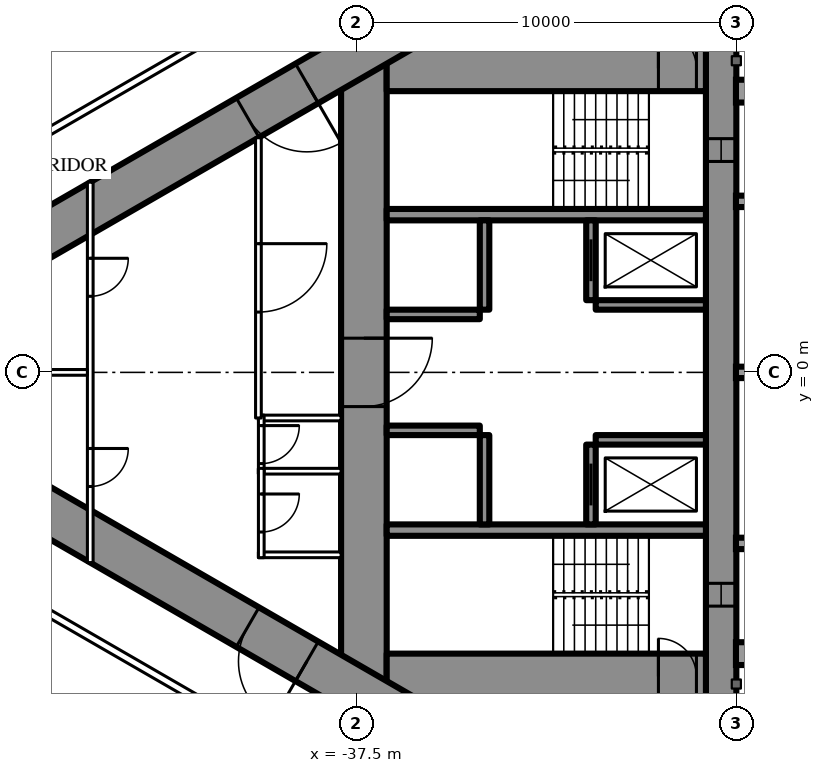
"""IFC4 building model, lengths in metres.
Left out: names, types, materials, properties, quantities, classifications, styles, units other than length and angle.
Written with IfcOpenShell. Run it as: python <this file> out.ifc"""

import sys

from ifc_helpers import new_model, si_unit, direction, frame, frame_2d, origin, place, context, subcontext, project, spatial, rectangle, extrude, element, fill, save


model = new_model("IFC4")
c1 = context("Model", 3, precision=1e-05, world=origin(), true_north=direction((0.0, 1.0)))
c2 = subcontext(c1, "Body", "Model", "MODEL_VIEW")
j1 = project(units=[si_unit("LENGTHUNIT", "METRE"), si_unit("PLANEANGLEUNIT", "RADIAN")], contexts=[c1])
p1 = place(None, origin())
s1 = spatial("IfcSite", under=j1, at=p1, CompositionType="ELEMENT")
p2 = place(p1, origin())
s2 = spatial("IfcBuilding", under=s1, at=p2, CompositionType="ELEMENT")
p3 = place(p2, frame((0.0, 0.0, 94.1)))
s3 = spatial("IfcBuildingStorey", under=s2, at=p3, CompositionType="ELEMENT", Elevation=94.1)
p4 = place(p3, frame((-27.9, 8.6, 0.0), z_axis=(0.0, 0.0, 1.0), x_axis=(0.0, -1.0, 0.0)))
e1 = element("IfcWall", 1, at=p4, inside=s3, PredefinedType="SHEAR", context=c2, shape_type="SweptSolid", body=[
    extrude(rectangle(XDim=17.2, YDim=0.8, at=frame_2d((8.6, 0.0))), origin(), (0.0, 0.0, 1.0), 3.5),
])
p5 = place(p4, frame((2.45, 0.0, 0.6)))
e2 = element("IfcOpeningElement", 2, at=p5, cuts=e1, PredefinedType="OPENING", context=c2, shape_type="SweptSolid", body=[
    extrude(rectangle(XDim=0.6, YDim=2.1, at=frame_2d((0.3, 1.05))), frame((0.0, 0.41, 0.0), z_axis=(0.0, -1.0, 0.0), x_axis=(1.0, 0.0, 0.0)), (0.0, 0.0, 1.0), 0.82),
])
p6 = place(p4, frame((14.15, 0.0, 0.6)))
e3 = element("IfcOpeningElement", 3, at=p6, cuts=e1, PredefinedType="OPENING", context=c2, shape_type="SweptSolid", body=[
    extrude(rectangle(XDim=0.6, YDim=2.1, at=frame_2d((0.3, 1.05))), frame((0.0, 0.41, 0.0), z_axis=(0.0, -1.0, 0.0), x_axis=(1.0, 0.0, 0.0)), (0.0, 0.0, 1.0), 0.82),
])
p7 = place(p3, frame((-37.3, 8.6, 0.0), z_axis=(0.0, 0.0, 1.0), x_axis=(0.0, -1.0, 0.0)))
e4 = element("IfcWall", 4, at=p7, inside=s3, PredefinedType="SHEAR", context=c2, shape_type="SweptSolid", body=[
    extrude(rectangle(XDim=17.2, YDim=1.2, at=frame_2d((8.6, 0.0))), origin(), (0.0, 0.0, 1.0), 3.5),
])
p8 = place(p7, frame((7.7, 0.0, 0.0)))
e5 = element("IfcOpeningElement", 5, at=p8, cuts=e4, PredefinedType="OPENING", context=c2, shape_type="SweptSolid", body=[
    extrude(rectangle(XDim=1.8, YDim=2.2, at=frame_2d((0.9, 1.1))), frame((0.0, 0.61, 0.0), z_axis=(0.0, -1.0, 0.0), x_axis=(1.0, 0.0, 0.0)), (0.0, 0.0, 1.0), 1.22),
])
p9 = place(p3, frame((-28.3, 8.0, 0.0), z_axis=(0.0, 0.0, 1.0), x_axis=(-1.0, 0.0, 0.0)))
e6 = element("IfcWall", 6, at=p9, inside=s3, PredefinedType="SHEAR", context=c2, shape_type="SweptSolid", body=[
    extrude(rectangle(XDim=8.4, YDim=1.2, at=frame_2d((4.2, 0.0))), origin(), (0.0, 0.0, 1.0), 3.5),
])
p10 = place(p9, frame((0.25, 0.0, 0.0)))
e7 = element("IfcOpeningElement", 7, at=p10, cuts=e6, PredefinedType="OPENING", context=c2, shape_type="SweptSolid", body=[
    extrude(rectangle(XDim=1.0, YDim=2.2, at=frame_2d((0.5, 1.1))), frame((0.0, 0.61, 0.0), z_axis=(0.0, -1.0, 0.0), x_axis=(1.0, 0.0, 0.0)), (0.0, 0.0, 1.0), 1.22),
])
p11 = place(p3, frame((-28.3, -8.0, 0.0), z_axis=(0.0, 0.0, 1.0), x_axis=(-1.0, 0.0, 0.0)))
e8 = element("IfcWall", 8, at=p11, inside=s3, PredefinedType="SHEAR", context=c2, shape_type="SweptSolid", body=[
    extrude(rectangle(XDim=8.4, YDim=1.2, at=frame_2d((4.2, 0.0))), origin(), (0.0, 0.0, 1.0), 3.5),
])
p12 = place(p11, frame((0.25, 0.0, 0.0)))
e9 = element("IfcOpeningElement", 9, at=p12, cuts=e8, PredefinedType="OPENING", context=c2, shape_type="SweptSolid", body=[
    extrude(rectangle(XDim=1.0, YDim=2.2, at=frame_2d((0.5, 1.1))), frame((0.0, 0.61, 0.0), z_axis=(0.0, -1.0, 0.0), x_axis=(1.0, 0.0, 0.0)), (0.0, 0.0, 1.0), 1.22),
])
for number, where, z_axis, x_axis in (
    (10, (-28.3, 4.15, 0.0), (0.0, 0.0, 1.0), (-1.0, 0.0, 0.0)),
    (11, (-28.3, -4.15, 0.0), (0.0, 0.0, 1.0), (-1.0, 0.0, 0.0)),
):
    element("IfcWall", number, at=place(p3, frame(where, z_axis=z_axis, x_axis=x_axis)), inside=s3, PredefinedType="SHEAR", context=c2, shape_type="SweptSolid", body=[
        extrude(rectangle(XDim=8.4, YDim=0.3, at=frame_2d((4.2, 0.0))), origin(), (0.0, 0.0, 1.0), 3.5),
    ])
p13 = place(p3, frame((-31.325, 4.0, 0.0), z_axis=(0.0, 0.0, 1.0), x_axis=(0.0, -1.0, 0.0)))
e12 = element("IfcWall", 12, at=p13, inside=s3, PredefinedType="SHEAR", context=c2, shape_type="SweptSolid", body=[
    extrude(rectangle(XDim=2.1, YDim=0.25, at=frame_2d((1.05, 0.0))), origin(), (0.0, 0.0, 1.0), 3.5),
])
p14 = place(p13, frame((0.5, 0.0, 0.0)))
e13 = element("IfcOpeningElement", 13, at=p14, cuts=e12, PredefinedType="OPENING", context=c2, shape_type="SweptSolid", body=[
    extrude(rectangle(XDim=1.1, YDim=2.2, at=frame_2d((0.55, 1.1))), frame((0.0, 0.135, 0.0), z_axis=(0.0, -1.0, 0.0), x_axis=(1.0, 0.0, 0.0)), (0.0, 0.0, 1.0), 0.27),
])
p15 = place(p3, frame((-34.125, 4.0, 0.0), z_axis=(0.0, 0.0, 1.0), x_axis=(0.0, -1.0, 0.0)))
e14 = element("IfcWall", 14, at=p15, inside=s3, PredefinedType="SHEAR", context=c2, shape_type="SweptSolid", body=[
    extrude(rectangle(XDim=2.35, YDim=0.25, at=frame_2d((1.175, 0.0))), origin(), (0.0, 0.0, 1.0), 3.5),
])
p16 = place(p3, frame((-28.3, 1.775, 0.0), z_axis=(0.0, 0.0, 1.0), x_axis=(-1.0, 0.0, 0.0)))
e15 = element("IfcWall", 15, at=p16, inside=s3, PredefinedType="SHEAR", context=c2, shape_type="SweptSolid", body=[
    extrude(rectangle(XDim=2.9, YDim=0.25, at=frame_2d((1.45, 0.0))), origin(), (0.0, 0.0, 1.0), 3.5),
])
p17 = place(p3, frame((-34.25, 1.525, 0.0), z_axis=(0.0, 0.0, 1.0), x_axis=(-1.0, 0.0, 0.0)))
e16 = element("IfcWall", 16, at=p17, inside=s3, PredefinedType="SHEAR", context=c2, shape_type="SweptSolid", body=[
    extrude(rectangle(XDim=2.45, YDim=0.25, at=frame_2d((1.225, 0.0))), origin(), (0.0, 0.0, 1.0), 3.5),
])
p18 = place(p3, frame((-31.325, -1.9, 0.0), z_axis=(0.0, 0.0, 1.0), x_axis=(0.0, -1.0, 0.0)))
e17 = element("IfcWall", 17, at=p18, inside=s3, PredefinedType="SHEAR", context=c2, shape_type="SweptSolid", body=[
    extrude(rectangle(XDim=2.1, YDim=0.25, at=frame_2d((1.05, 0.0))), origin(), (0.0, 0.0, 1.0), 3.5),
])
p19 = place(p18, frame((0.5, 0.0, 0.0)))
e18 = element("IfcOpeningElement", 18, at=p19, cuts=e17, PredefinedType="OPENING", context=c2, shape_type="SweptSolid", body=[
    extrude(rectangle(XDim=1.1, YDim=2.2, at=frame_2d((0.55, 1.1))), frame((0.0, 0.135, 0.0), z_axis=(0.0, -1.0, 0.0), x_axis=(1.0, 0.0, 0.0)), (0.0, 0.0, 1.0), 0.27),
])
p20 = place(p3, frame((-34.125, -1.65, 0.0), z_axis=(0.0, 0.0, 1.0), x_axis=(0.0, -1.0, 0.0)))
e19 = element("IfcWall", 19, at=p20, inside=s3, PredefinedType="SHEAR", context=c2, shape_type="SweptSolid", body=[
    extrude(rectangle(XDim=2.35, YDim=0.25, at=frame_2d((1.175, 0.0))), origin(), (0.0, 0.0, 1.0), 3.5),
])
p21 = place(p3, frame((-28.3, -1.775, 0.0), z_axis=(0.0, 0.0, 1.0), x_axis=(-1.0, 0.0, 0.0)))
e20 = element("IfcWall", 20, at=p21, inside=s3, PredefinedType="SHEAR", context=c2, shape_type="SweptSolid", body=[
    extrude(rectangle(XDim=2.9, YDim=0.25, at=frame_2d((1.45, 0.0))), origin(), (0.0, 0.0, 1.0), 3.5),
])
p22 = place(p3, frame((-34.25, -1.525, 0.0), z_axis=(0.0, 0.0, 1.0), x_axis=(-1.0, 0.0, 0.0)))
e21 = element("IfcWall", 21, at=p22, inside=s3, PredefinedType="SHEAR", context=c2, shape_type="SweptSolid", body=[
    extrude(rectangle(XDim=2.45, YDim=0.25, at=frame_2d((1.225, 0.0))), origin(), (0.0, 0.0, 1.0), 3.5),
])
p23 = place(p3, frame((-27.2, 14.3, 0.0), z_axis=(0.0, 0.0, 1.0), x_axis=(-0.866026593062, -0.499997940104, 0.0)))
e22 = element("IfcWall", 22, at=p23, inside=s3, PredefinedType="SHEAR", context=c2, shape_type="SweptSolid", body=[
    extrude(rectangle(XDim=28.946, YDim=1.2, at=frame_2d((14.473, 0.0))), origin(), (0.0, 0.0, 1.0), 3.5),
])
p24 = place(p23, frame((4.6, 0.0, 0.0)))
e23 = element("IfcOpeningElement", 23, at=p24, cuts=e22, PredefinedType="OPENING", context=c2, shape_type="SweptSolid", body=[
    extrude(rectangle(XDim=1.0, YDim=2.2, at=frame_2d((0.5, 1.1))), frame((0.0, 0.61, 0.0), z_axis=(0.0, -1.0, 0.0), x_axis=(1.0, 0.0, 0.0)), (0.0, 0.0, 1.0), 1.22),
])
p25 = place(p23, frame((13.395, 0.0, 0.0)))
e24 = element("IfcOpeningElement", 24, at=p25, cuts=e22, PredefinedType="OPENING", context=c2, shape_type="SweptSolid", body=[
    extrude(rectangle(XDim=1.8, YDim=2.2, at=frame_2d((0.9, 1.1))), frame((0.0, 0.61, 0.0), z_axis=(0.0, -1.0, 0.0), x_axis=(1.0, 0.0, 0.0)), (0.0, 0.0, 1.0), 1.22),
])
p26 = place(p3, frame((-27.2, -14.3, 0.0), z_axis=(0.0, 0.0, 1.0), x_axis=(-0.866024021859, 0.500002393557, 0.0)))
e25 = element("IfcWall", 25, at=p26, inside=s3, PredefinedType="SHEAR", context=c2, shape_type="SweptSolid", body=[
    extrude(rectangle(XDim=27.907, YDim=1.2, at=frame_2d((13.954, 0.0))), origin(), (0.0, 0.0, 1.0), 3.5),
])
p27 = place(p26, frame((4.6, 0.0, 0.0)))
e26 = element("IfcOpeningElement", 26, at=p27, cuts=e25, PredefinedType="OPENING", context=c2, shape_type="SweptSolid", body=[
    extrude(rectangle(XDim=1.0, YDim=2.2, at=frame_2d((0.5, 1.1))), frame((0.0, 0.61, 0.0), z_axis=(0.0, -1.0, 0.0), x_axis=(1.0, 0.0, 0.0)), (0.0, 0.0, 1.0), 1.22),
])
p28 = place(p26, frame((13.395, 0.0, 0.0)))
e27 = element("IfcOpeningElement", 27, at=p28, cuts=e25, PredefinedType="OPENING", context=c2, shape_type="SweptSolid", body=[
    extrude(rectangle(XDim=1.8, YDim=2.2, at=frame_2d((0.9, 1.1))), frame((0.0, 0.61, 0.0), z_axis=(0.0, -1.0, 0.0), x_axis=(1.0, 0.0, 0.0)), (0.0, 0.0, 1.0), 1.22),
])
p29 = place(p3, frame((-37.7, 10.894, 0.0), z_axis=(0.0, 0.0, 1.0), x_axis=(-0.866027905338, -0.499995667157, 0.0)))
e28 = element("IfcWall", 28, at=p29, inside=s3, PredefinedType="PARTITIONING", context=c2, shape_type="SweptSolid", body=[
    extrude(rectangle(XDim=21.787, YDim=0.2, at=frame_2d((10.894, 0.0))), origin(), (0.0, 0.0, 1.0), 3.25),
])
p30 = place(p29, frame((17.887, 0.0, 0.0)))
e29 = element("IfcOpeningElement", 29, at=p30, cuts=e28, PredefinedType="OPENING", context=c2, shape_type="SweptSolid", body=[
    extrude(rectangle(XDim=0.95, YDim=2.2, at=frame_2d((0.475, 1.1))), frame((0.0, 0.11, 0.0), z_axis=(0.0, -1.0, 0.0), x_axis=(1.0, 0.0, 0.0)), (0.0, 0.0, 1.0), 0.22),
])
p31 = place(p29, frame((9.531, 0.0, 0.0)))
e30 = element("IfcOpeningElement", 30, at=p31, cuts=e28, PredefinedType="OPENING", context=c2, shape_type="SweptSolid", body=[
    extrude(rectangle(XDim=0.95, YDim=2.2, at=frame_2d((0.475, 1.1))), frame((0.0, 0.11, 0.0), z_axis=(0.0, -1.0, 0.0), x_axis=(1.0, 0.0, 0.0)), (0.0, 0.0, 1.0), 0.22),
])
p32 = place(p3, frame((-36.92, -11.344, 0.0), z_axis=(0.0, 0.0, 1.0), x_axis=(-0.866028313256, 0.499994960614, 0.0)))
e31 = element("IfcWall", 31, at=p32, inside=s3, PredefinedType="PARTITIONING", context=c2, shape_type="SweptSolid", body=[
    extrude(rectangle(XDim=22.568, YDim=0.2, at=frame_2d((11.284, 0.0))), origin(), (0.0, 0.0, 1.0), 3.25),
])
p33 = place(p32, frame((14.481, 0.0, 0.0)))
e32 = element("IfcOpeningElement", 32, at=p33, cuts=e31, PredefinedType="OPENING", context=c2, shape_type="SweptSolid", body=[
    extrude(rectangle(XDim=0.95, YDim=2.2, at=frame_2d((0.475, 1.1))), frame((0.0, 0.11, 0.0), z_axis=(0.0, -1.0, 0.0), x_axis=(1.0, 0.0, 0.0)), (0.0, 0.0, 1.0), 0.22),
])
p34 = place(p32, frame((3.35, 0.0, 0.0)))
e33 = element("IfcOpeningElement", 33, at=p34, cuts=e31, PredefinedType="OPENING", context=c2, shape_type="SweptSolid", body=[
    extrude(rectangle(XDim=1.0, YDim=2.2, at=frame_2d((0.5, 1.1))), frame((0.0, 0.11, 0.0), z_axis=(0.0, -1.0, 0.0), x_axis=(1.0, 0.0, 0.0)), (0.0, 0.0, 1.0), 0.22),
])
for number, where, z_axis, x_axis in (
    (34, (-37.9, -1.2, 0.0), (0.0, 0.0, 1.0), (-1.0, 0.0, 0.0)),
    (35, (-37.9, -2.6, 0.0), (0.0, 0.0, 1.0), (-1.0, 0.0, 0.0)),
    (36, (-37.9, -4.8, 0.0), (0.0, 0.0, 1.0), (-1.0, 0.0, 0.0)),
):
    element("IfcWall", number, at=place(p3, frame(where, z_axis=z_axis, x_axis=x_axis)), inside=s3, PredefinedType="PARTITIONING", context=c2, shape_type="SweptSolid", body=[
        extrude(rectangle(XDim=2.175, YDim=0.15, at=frame_2d((1.087, 0.0))), origin(), (0.0, 0.0, 1.0), 3.25),
    ])
p35 = place(p3, frame((-40.0, -1.125, 0.0), z_axis=(0.0, 0.0, 1.0), x_axis=(0.0, -1.0, 0.0)))
e37 = element("IfcWall", 37, at=p35, inside=s3, PredefinedType="PARTITIONING", context=c2, shape_type="SweptSolid", body=[
    extrude(rectangle(XDim=1.55, YDim=0.15, at=frame_2d((0.775, 0.0))), origin(), (0.0, 0.0, 1.0), 3.25),
])
p36 = place(p35, frame((0.275, 0.0, 0.0)))
e38 = element("IfcOpeningElement", 38, at=p36, cuts=e37, PredefinedType="OPENING", context=c2, shape_type="SweptSolid", body=[
    extrude(rectangle(XDim=1.0, YDim=2.2, at=frame_2d((0.5, 1.1))), frame((0.0, 0.085, 0.0), z_axis=(0.0, -1.0, 0.0), x_axis=(1.0, 0.0, 0.0)), (0.0, 0.0, 1.0), 0.17),
])
p37 = place(p3, frame((-40.0, -2.525, 0.0), z_axis=(0.0, 0.0, 1.0), x_axis=(0.0, -1.0, 0.0)))
e39 = element("IfcWall", 39, at=p37, inside=s3, PredefinedType="PARTITIONING", context=c2, shape_type="SweptSolid", body=[
    extrude(rectangle(XDim=2.35, YDim=0.15, at=frame_2d((1.175, 0.0))), origin(), (0.0, 0.0, 1.0), 3.25),
])
p38 = place(p37, frame((0.675, 0.0, 0.0)))
e40 = element("IfcOpeningElement", 40, at=p38, cuts=e39, PredefinedType="OPENING", context=c2, shape_type="SweptSolid", body=[
    extrude(rectangle(XDim=1.0, YDim=2.2, at=frame_2d((0.5, 1.1))), frame((0.0, 0.085, 0.0), z_axis=(0.0, -1.0, 0.0), x_axis=(1.0, 0.0, 0.0)), (0.0, 0.0, 1.0), 0.17),
])
p39 = place(p3, frame((-40.075, 6.174, 0.0), z_axis=(0.0, 0.0, 1.0), x_axis=(0.0, -1.0, 0.0)))
e41 = element("IfcWall", 41, at=p39, inside=s3, PredefinedType="PARTITIONING", context=c2, shape_type="SweptSolid", body=[
    extrude(rectangle(XDim=7.374, YDim=0.15, at=frame_2d((3.687, 0.0))), origin(), (0.0, 0.0, 1.0), 3.25),
])
p40 = place(p39, frame((2.787, 0.0, 0.0)))
e42 = element("IfcOpeningElement", 42, at=p40, cuts=e41, PredefinedType="OPENING", context=c2, shape_type="SweptSolid", body=[
    extrude(rectangle(XDim=1.8, YDim=2.2, at=frame_2d((0.9, 1.1))), frame((0.0, 0.085, 0.0), z_axis=(0.0, -1.0, 0.0), x_axis=(1.0, 0.0, 0.0)), (0.0, 0.0, 1.0), 0.17),
])
p41 = place(p3, frame((-44.5, 5.005, 0.0), z_axis=(0.0, 0.0, 1.0), x_axis=(0.0, -1.0, 0.0)))
e43 = element("IfcWall", 43, at=p41, inside=s3, PredefinedType="PARTITIONING", context=c2, shape_type="SweptSolid", body=[
    extrude(rectangle(XDim=10.009, YDim=0.15, at=frame_2d((5.005, 0.0))), origin(), (0.0, 0.0, 1.0), 2.45),
])
p42 = place(p41, frame((2.002, 0.0, 0.0)))
e44 = element("IfcOpeningElement", 44, at=p42, cuts=e43, PredefinedType="OPENING", context=c2, shape_type="SweptSolid", body=[
    extrude(rectangle(XDim=1.0, YDim=2.2, at=frame_2d((0.5, 1.1))), frame((0.0, 0.085, 0.0), z_axis=(0.0, -1.0, 0.0), x_axis=(1.0, 0.0, 0.0)), (0.0, 0.0, 1.0), 0.17),
])
p43 = place(p41, frame((7.007, 0.0, 0.0)))
e45 = element("IfcOpeningElement", 45, at=p43, cuts=e43, PredefinedType="OPENING", context=c2, shape_type="SweptSolid", body=[
    extrude(rectangle(XDim=1.0, YDim=2.2, at=frame_2d((0.5, 1.1))), frame((0.0, 0.085, 0.0), z_axis=(0.0, -1.0, 0.0), x_axis=(1.0, 0.0, 0.0)), (0.0, 0.0, 1.0), 0.17),
])
p44 = place(p3, frame((-44.575, 0.0, 0.0), z_axis=(0.0, 0.0, 1.0), x_axis=(-1.0, 0.0, 0.0)))
e46 = element("IfcWall", 46, at=p44, inside=s3, PredefinedType="PARTITIONING", context=c2, shape_type="SweptSolid", body=[
    extrude(rectangle(XDim=8.593, YDim=0.15, at=frame_2d((4.297, 0.0))), origin(), (0.0, 0.0, 1.0), 2.2),
])
p45 = place(p36, origin())
e47 = element("IfcDoor", 47, at=p45, inside=s3, OperationType="SINGLE_SWING_LEFT", PredefinedType="DOOR", context=c2, shape_type="SweptSolid", body=[
    extrude(rectangle(XDim=1.0, YDim=2.2, at=frame_2d((0.5, 1.1))), frame((0.0, 0.025, 0.0), z_axis=(0.0, -1.0, 0.0), x_axis=(1.0, 0.0, 0.0)), (0.0, 0.0, 1.0), 0.05),
])
fill(e38, e47)
p46 = place(p38, origin())
e48 = element("IfcDoor", 48, at=p46, inside=s3, OperationType="SINGLE_SWING_LEFT", PredefinedType="DOOR", context=c2, shape_type="SweptSolid", body=[
    extrude(rectangle(XDim=1.0, YDim=2.2, at=frame_2d((0.5, 1.1))), frame((0.0, 0.025, 0.0), z_axis=(0.0, -1.0, 0.0), x_axis=(1.0, 0.0, 0.0)), (0.0, 0.0, 1.0), 0.05),
])
fill(e40, e48)
p47 = place(p40, origin())
e49 = element("IfcDoor", 49, at=p47, inside=s3, OperationType="DOUBLE_DOOR_SINGLE_SWING", PredefinedType="DOOR", context=c2, shape_type="SweptSolid", body=[
    extrude(rectangle(XDim=1.8, YDim=2.2, at=frame_2d((0.9, 1.1))), frame((0.0, 0.025, 0.0), z_axis=(0.0, -1.0, 0.0), x_axis=(1.0, 0.0, 0.0)), (0.0, 0.0, 1.0), 0.05),
])
fill(e42, e49)
p48 = place(p42, origin())
e50 = element("IfcDoor", 50, at=p48, inside=s3, OperationType="SINGLE_SWING_LEFT", PredefinedType="DOOR", context=c2, shape_type="SweptSolid", body=[
    extrude(rectangle(XDim=1.0, YDim=2.2, at=frame_2d((0.5, 1.1))), frame((0.0, 0.025, 0.0), z_axis=(0.0, -1.0, 0.0), x_axis=(1.0, 0.0, 0.0)), (0.0, 0.0, 1.0), 0.05),
])
fill(e44, e50)
p49 = place(p43, origin())
e51 = element("IfcDoor", 51, at=p49, inside=s3, OperationType="SINGLE_SWING_LEFT", PredefinedType="DOOR", context=c2, shape_type="SweptSolid", body=[
    extrude(rectangle(XDim=1.0, YDim=2.2, at=frame_2d((0.5, 1.1))), frame((0.0, 0.025, 0.0), z_axis=(0.0, -1.0, 0.0), x_axis=(1.0, 0.0, 0.0)), (0.0, 0.0, 1.0), 0.05),
])
fill(e45, e51)
p50 = place(p25, origin())
e52 = element("IfcDoor", 52, at=p50, inside=s3, OperationType="DOUBLE_DOOR_SINGLE_SWING", PredefinedType="DOOR", context=c2, shape_type="SweptSolid", body=[
    extrude(rectangle(XDim=1.8, YDim=2.2, at=frame_2d((0.9, 1.1))), frame((0.0, 0.025, 0.0), z_axis=(0.0, -1.0, 0.0), x_axis=(1.0, 0.0, 0.0)), (0.0, 0.0, 1.0), 0.05),
])
fill(e24, e52)
p51 = place(p28, origin())
e53 = element("IfcDoor", 53, at=p51, inside=s3, OperationType="DOUBLE_DOOR_SINGLE_SWING", PredefinedType="DOOR", context=c2, shape_type="SweptSolid", body=[
    extrude(rectangle(XDim=1.8, YDim=2.2, at=frame_2d((0.9, 1.1))), frame((0.0, 0.025, 0.0), z_axis=(0.0, -1.0, 0.0), x_axis=(1.0, 0.0, 0.0)), (0.0, 0.0, 1.0), 0.05),
])
fill(e27, e53)
p52 = place(p8, origin())
e54 = element("IfcDoor", 54, at=p52, inside=s3, OperationType="DOUBLE_DOOR_SINGLE_SWING", PredefinedType="DOOR", context=c2, shape_type="SweptSolid", body=[
    extrude(rectangle(XDim=1.8, YDim=2.2, at=frame_2d((0.9, 1.1))), frame((0.0, 0.025, 0.0), z_axis=(0.0, -1.0, 0.0), x_axis=(1.0, 0.0, 0.0)), (0.0, 0.0, 1.0), 0.05),
])
fill(e5, e54)
p53 = place(p10, origin())
e55 = element("IfcDoor", 55, at=p53, inside=s3, OperationType="SINGLE_SWING_RIGHT", PredefinedType="DOOR", context=c2, shape_type="SweptSolid", body=[
    extrude(rectangle(XDim=1.0, YDim=2.2, at=frame_2d((0.5, 1.1))), frame((0.0, 0.025, 0.0), z_axis=(0.0, -1.0, 0.0), x_axis=(1.0, 0.0, 0.0)), (0.0, 0.0, 1.0), 0.05),
])
fill(e7, e55)
p54 = place(p12, origin())
e56 = element("IfcDoor", 56, at=p54, inside=s3, OperationType="SINGLE_SWING_RIGHT", PredefinedType="DOOR", context=c2, shape_type="SweptSolid", body=[
    extrude(rectangle(XDim=1.0, YDim=2.2, at=frame_2d((0.5, 1.1))), frame((0.0, 0.025, 0.0), z_axis=(0.0, -1.0, 0.0), x_axis=(1.0, 0.0, 0.0)), (0.0, 0.0, 1.0), 0.05),
])
fill(e9, e56)
p55 = place(p14, origin())
e57 = element("IfcDoor", 57, at=p55, inside=s3, OperationType="SLIDING_TO_LEFT", PredefinedType="USERDEFINED", context=c2, shape_type="SweptSolid", body=[
    extrude(rectangle(XDim=1.1, YDim=2.2, at=frame_2d((0.55, 1.1))), frame((0.0, 0.025, 0.0), z_axis=(0.0, -1.0, 0.0), x_axis=(1.0, 0.0, 0.0)), (0.0, 0.0, 1.0), 0.05),
])
fill(e13, e57)
p56 = place(p19, origin())
e58 = element("IfcDoor", 58, at=p56, inside=s3, OperationType="SLIDING_TO_LEFT", PredefinedType="USERDEFINED", context=c2, shape_type="SweptSolid", body=[
    extrude(rectangle(XDim=1.1, YDim=2.2, at=frame_2d((0.55, 1.1))), frame((0.0, 0.025, 0.0), z_axis=(0.0, -1.0, 0.0), x_axis=(1.0, 0.0, 0.0)), (0.0, 0.0, 1.0), 0.05),
])
fill(e18, e58)
p57 = place(p5, origin())
e59 = element("IfcWindow", 59, at=p57, inside=s3, PartitioningType="SINGLE_PANEL", PredefinedType="WINDOW", context=c2, shape_type="SweptSolid", body=[
    extrude(rectangle(XDim=0.6, YDim=2.1, at=frame_2d((0.3, 1.05))), frame((0.0, 0.03, 0.0), z_axis=(0.0, -1.0, 0.0), x_axis=(1.0, 0.0, 0.0)), (0.0, 0.0, 1.0), 0.06),
])
fill(e2, e59)
p58 = place(p6, origin())
e60 = element("IfcWindow", 60, at=p58, inside=s3, PartitioningType="SINGLE_PANEL", PredefinedType="WINDOW", context=c2, shape_type="SweptSolid", body=[
    extrude(rectangle(XDim=0.6, YDim=2.1, at=frame_2d((0.3, 1.05))), frame((0.0, 0.03, 0.0), z_axis=(0.0, -1.0, 0.0), x_axis=(1.0, 0.0, 0.0)), (0.0, 0.0, 1.0), 0.06),
])
fill(e3, e60)
save(model, sys.argv[1])
